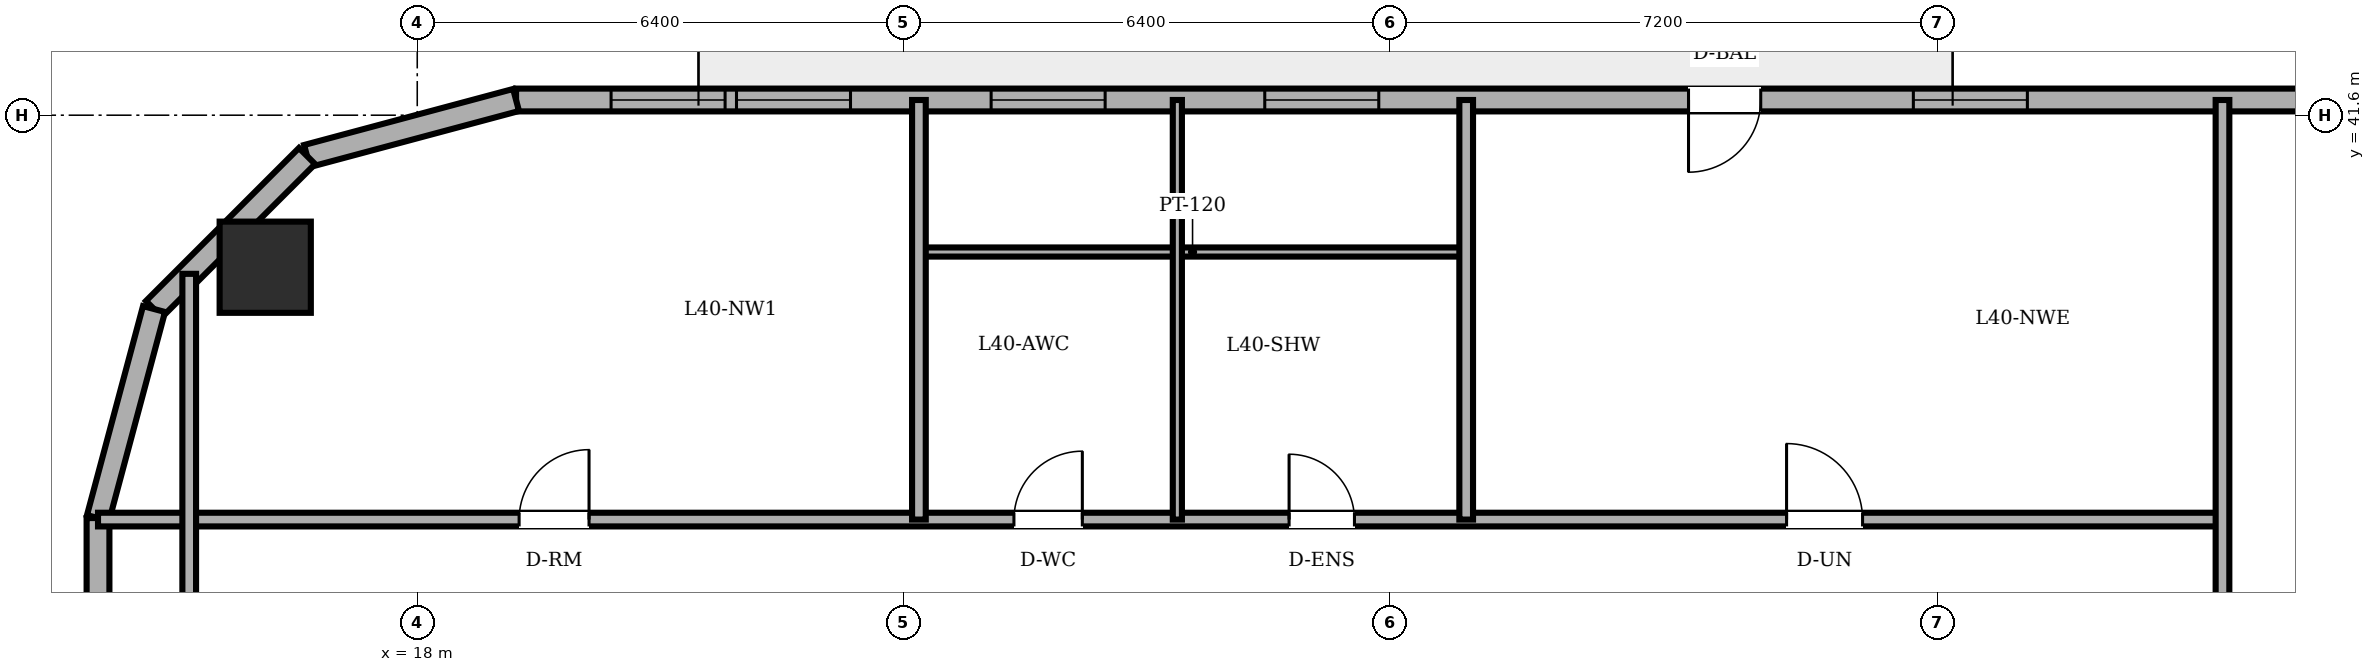
"""IFC4 building model, lengths in metres.
Left out: names, types, materials, properties, quantities, classifications, styles, units other than length and angle.
Written with IfcOpenShell. Run it as: python <this file> out.ifc"""

import sys

from ifc_helpers import new_model, si_unit, direction, frame, frame_2d, origin, origin_2d, place, context, subcontext, project, spatial, rectangle, circle, extrude, element, fill, save


model = new_model("IFC4")
c1 = context("Model", 3, precision=1e-05, world=origin(), true_north=direction((0.0, 1.0)))
c2 = subcontext(c1, "Body", "Model", "MODEL_VIEW")
j1 = project(units=[si_unit("LENGTHUNIT", "METRE"), si_unit("PLANEANGLEUNIT", "RADIAN")], contexts=[c1])
p1 = place(None, origin())
s1 = spatial("IfcSite", under=j1, at=p1, CompositionType="ELEMENT")
p2 = place(p1, origin())
s2 = spatial("IfcBuilding", under=s1, at=p2, CompositionType="ELEMENT")
p3 = place(p2, frame((0.0, 0.0, 154.6)))
s3 = spatial("IfcBuildingStorey", under=s2, at=p3, CompositionType="ELEMENT", Elevation=154.6)
p4 = place(p3, frame((16.0, 39.6, 0.0), z_axis=(0.0, 0.0, 1.0), x_axis=(1.0, 0.0, 0.0)))
e1 = element("IfcColumn", 1, at=p4, inside=s3, PredefinedType="COLUMN", context=c2, shape_type="SweptSolid", body=[
    extrude(circle(Radius=0.6, at=origin_2d()), origin(), (0.0, 0.0, 1.0), 3.6),
])
p5 = place(p3, frame((49.582, 41.8, 0.0), z_axis=(0.0, 0.0, 1.0), x_axis=(-1.0, 0.0, 0.0)))
e2 = element("IfcWall", 2, at=p5, inside=s3, PredefinedType="SOLIDWALL", context=c2, shape_type="SweptSolid", body=[
    extrude(rectangle(XDim=30.282, YDim=0.3, at=frame_2d((15.141, 0.0))), origin(), (0.0, 0.0, 1.0), 3.4),
])
p6 = place(p5, frame((13.907, 0.0, 0.0)))
e3 = element("IfcOpeningElement", 3, at=p6, cuts=e2, PredefinedType="OPENING", context=c2, shape_type="SweptSolid", body=[
    extrude(rectangle(XDim=0.95, YDim=2.2, at=frame_2d((0.475, 1.1))), frame((0.0, 0.16, 0.0), z_axis=(0.0, -1.0, 0.0), x_axis=(1.0, 0.0, 0.0)), (0.0, 0.0, 1.0), 0.32),
])
p7 = place(p5, frame((2.094, 0.0, 0.85)))
e4 = element("IfcOpeningElement", 4, at=p7, cuts=e2, PredefinedType="OPENING", context=c2, shape_type="SweptSolid", body=[
    extrude(rectangle(XDim=1.5, YDim=1.55, at=frame_2d((0.75, 0.775))), frame((0.0, 0.16, 0.0), z_axis=(0.0, -1.0, 0.0), x_axis=(1.0, 0.0, 0.0)), (0.0, 0.0, 1.0), 0.32),
])
p8 = place(p5, frame((4.588, 0.0, 0.85)))
e5 = element("IfcOpeningElement", 5, at=p8, cuts=e2, PredefinedType="OPENING", context=c2, shape_type="SweptSolid", body=[
    extrude(rectangle(XDim=1.5, YDim=1.55, at=frame_2d((0.75, 0.775))), frame((0.0, 0.16, 0.0), z_axis=(0.0, -1.0, 0.0), x_axis=(1.0, 0.0, 0.0)), (0.0, 0.0, 1.0), 0.32),
])
p9 = place(p5, frame((10.399, 0.0, 0.85)))
e6 = element("IfcOpeningElement", 6, at=p9, cuts=e2, PredefinedType="OPENING", context=c2, shape_type="SweptSolid", body=[
    extrude(rectangle(XDim=1.5, YDim=1.55, at=frame_2d((0.75, 0.775))), frame((0.0, 0.16, 0.0), z_axis=(0.0, -1.0, 0.0), x_axis=(1.0, 0.0, 0.0)), (0.0, 0.0, 1.0), 0.32),
])
p10 = place(p5, frame((18.932, 0.0, 0.85)))
e7 = element("IfcOpeningElement", 7, at=p10, cuts=e2, PredefinedType="OPENING", context=c2, shape_type="SweptSolid", body=[
    extrude(rectangle(XDim=1.5, YDim=1.55, at=frame_2d((0.75, 0.775))), frame((0.0, 0.16, 0.0), z_axis=(0.0, -1.0, 0.0), x_axis=(1.0, 0.0, 0.0)), (0.0, 0.0, 1.0), 0.32),
])
p11 = place(p5, frame((22.532, 0.0, 0.85)))
e8 = element("IfcOpeningElement", 8, at=p11, cuts=e2, PredefinedType="OPENING", context=c2, shape_type="SweptSolid", body=[
    extrude(rectangle(XDim=1.5, YDim=1.55, at=frame_2d((0.75, 0.775))), frame((0.0, 0.16, 0.0), z_axis=(0.0, -1.0, 0.0), x_axis=(1.0, 0.0, 0.0)), (0.0, 0.0, 1.0), 0.32),
])
p12 = place(p5, frame((25.882, 0.0, 0.85)))
e9 = element("IfcOpeningElement", 9, at=p12, cuts=e2, PredefinedType="OPENING", context=c2, shape_type="SweptSolid", body=[
    extrude(rectangle(XDim=1.5, YDim=1.55, at=frame_2d((0.75, 0.775))), frame((0.0, 0.16, 0.0), z_axis=(0.0, -1.0, 0.0), x_axis=(1.0, 0.0, 0.0)), (0.0, 0.0, 1.0), 0.32),
])
p13 = place(p5, frame((27.532, 0.0, 0.85)))
e10 = element("IfcOpeningElement", 10, at=p13, cuts=e2, PredefinedType="OPENING", context=c2, shape_type="SweptSolid", body=[
    extrude(rectangle(XDim=1.5, YDim=1.55, at=frame_2d((0.75, 0.775))), frame((0.0, 0.16, 0.0), z_axis=(0.0, -1.0, 0.0), x_axis=(1.0, 0.0, 0.0)), (0.0, 0.0, 1.0), 0.32),
])
p14 = place(p3, frame((19.3, 41.8, 0.0), z_axis=(0.0, 0.0, 1.0), x_axis=(-0.965908238586, -0.258884674387, 0.0)))
e11 = element("IfcWall", 11, at=p14, inside=s3, PredefinedType="SOLIDWALL", context=c2, shape_type="SweptSolid", body=[
    extrude(rectangle(XDim=2.847, YDim=0.3, at=frame_2d((1.424, 0.0))), origin(), (0.0, 0.0, 1.0), 3.4),
])
p15 = place(p3, frame((16.55, 41.063, 0.0), z_axis=(0.0, 0.0, 1.0), x_axis=(-0.707106781187, -0.707106781187, 0.0)))
e12 = element("IfcWall", 12, at=p15, inside=s3, PredefinedType="SOLIDWALL", context=c2, shape_type="SweptSolid", body=[
    extrude(rectangle(XDim=2.847, YDim=0.3, at=frame_2d((1.423, 0.0))), origin(), (0.0, 0.0, 1.0), 3.4),
])
p16 = place(p3, frame((14.537, 39.05, 0.0), z_axis=(0.0, 0.0, 1.0), x_axis=(-0.258884674387, -0.965908238586, 0.0)))
e13 = element("IfcWall", 13, at=p16, inside=s3, PredefinedType="SOLIDWALL", context=c2, shape_type="SweptSolid", body=[
    extrude(rectangle(XDim=2.847, YDim=0.3, at=frame_2d((1.424, 0.0))), origin(), (0.0, 0.0, 1.0), 3.4),
])
p17 = place(p3, frame((13.8, 36.3, 0.0), z_axis=(0.0, 0.0, 1.0), x_axis=(0.0, -1.0, 0.0)))
e14 = element("IfcWall", 14, at=p17, inside=s3, PredefinedType="SOLIDWALL", context=c2, shape_type="SweptSolid", body=[
    extrude(rectangle(XDim=24.6, YDim=0.3, at=frame_2d((12.3, 0.0))), origin(), (0.0, 0.0, 1.0), 3.4),
])
p18 = place(p17, frame((8.277, 0.0, 0.85)))
e15 = element("IfcOpeningElement", 15, at=p18, cuts=e14, PredefinedType="OPENING", context=c2, shape_type="SweptSolid", body=[
    extrude(rectangle(XDim=1.5, YDim=1.55, at=frame_2d((0.75, 0.775))), frame((0.0, 0.16, 0.0), z_axis=(0.0, -1.0, 0.0), x_axis=(1.0, 0.0, 0.0)), (0.0, 0.0, 1.0), 0.32),
])
p19 = place(p17, frame((14.823, 0.0, 0.85)))
e16 = element("IfcOpeningElement", 16, at=p19, cuts=e14, PredefinedType="OPENING", context=c2, shape_type="SweptSolid", body=[
    extrude(rectangle(XDim=1.5, YDim=1.55, at=frame_2d((0.75, 0.775))), frame((0.0, 0.16, 0.0), z_axis=(0.0, -1.0, 0.0), x_axis=(1.0, 0.0, 0.0)), (0.0, 0.0, 1.0), 0.32),
])
p20 = place(p3, frame((13.8, 36.28, 0.0), z_axis=(0.0, 0.0, 1.0), x_axis=(1.0, 0.0, 0.0)))
e17 = element("IfcWall", 17, at=p20, inside=s3, PredefinedType="PARTITIONING", context=c2, shape_type="SweptSolid", body=[
    extrude(rectangle(XDim=27.95, YDim=0.18, at=frame_2d((13.975, 0.0))), origin(), (0.0, 0.0, 1.0), 3.4),
])
p21 = place(p20, frame((12.05, 0.0, 0.0)))
e18 = element("IfcOpeningElement", 18, at=p21, cuts=e17, PredefinedType="OPENING", context=c2, shape_type="SweptSolid", body=[
    extrude(rectangle(XDim=0.9, YDim=2.1, at=frame_2d((0.45, 1.05))), frame((0.0, 0.1, 0.0), z_axis=(0.0, -1.0, 0.0), x_axis=(1.0, 0.0, 0.0)), (0.0, 0.0, 1.0), 0.2),
])
p22 = place(p20, frame((15.67, 0.0, 0.0)))
e19 = element("IfcOpeningElement", 19, at=p22, cuts=e17, PredefinedType="OPENING", context=c2, shape_type="SweptSolid", body=[
    extrude(rectangle(XDim=0.86, YDim=2.1, at=frame_2d((0.43, 1.05))), frame((0.0, 0.1, 0.0), z_axis=(0.0, -1.0, 0.0), x_axis=(1.0, 0.0, 0.0)), (0.0, 0.0, 1.0), 0.2),
])
p23 = place(p20, frame((5.54, 0.0, 0.0)))
e20 = element("IfcOpeningElement", 20, at=p23, cuts=e17, PredefinedType="OPENING", context=c2, shape_type="SweptSolid", body=[
    extrude(rectangle(XDim=0.92, YDim=2.1, at=frame_2d((0.46, 1.05))), frame((0.0, 0.1, 0.0), z_axis=(0.0, -1.0, 0.0), x_axis=(1.0, 0.0, 0.0)), (0.0, 0.0, 1.0), 0.2),
])
p24 = place(p20, frame((22.215, 0.0, 0.0)))
e21 = element("IfcOpeningElement", 21, at=p24, cuts=e17, PredefinedType="OPENING", context=c2, shape_type="SweptSolid", body=[
    extrude(rectangle(XDim=1.0, YDim=2.15, at=frame_2d((0.5, 1.075))), frame((0.0, 0.1, 0.0), z_axis=(0.0, -1.0, 0.0), x_axis=(1.0, 0.0, 0.0)), (0.0, 0.0, 1.0), 0.2),
])
p25 = place(p3, frame((24.6, 39.8, 0.0), z_axis=(0.0, 0.0, 1.0), x_axis=(1.0, 0.0, 0.0)))
e22 = element("IfcWall", 22, at=p25, inside=s3, PredefinedType="PARTITIONING", context=c2, shape_type="SweptSolid", body=[
    extrude(rectangle(XDim=7.2, YDim=0.12, at=frame_2d((3.6, 0.0))), origin(), (0.0, 0.0, 1.0), 2.882),
])
p26 = place(p3, frame((15.0, 33.82, 0.0), z_axis=(0.0, 0.0, 1.0), x_axis=(0.0, 1.0, 0.0)))
e23 = element("IfcWall", 23, at=p26, inside=s3, PredefinedType="PARTITIONING", context=c2, shape_type="SweptSolid", body=[
    extrude(rectangle(XDim=5.693, YDim=0.18, at=frame_2d((2.846, 0.0))), origin(), (0.0, 0.0, 1.0), 3.4),
])
p27 = place(p3, frame((24.6, 36.28, 0.0), z_axis=(0.0, 0.0, 1.0), x_axis=(0.0, 1.0, 0.0)))
e24 = element("IfcWall", 24, at=p27, inside=s3, PredefinedType="PARTITIONING", context=c2, shape_type="SweptSolid", body=[
    extrude(rectangle(XDim=5.52, YDim=0.18, at=frame_2d((2.76, 0.0))), origin(), (0.0, 0.0, 1.0), 3.4),
])
p28 = place(p3, frame((28.0, 36.28, 0.0), z_axis=(0.0, 0.0, 1.0), x_axis=(0.0, 1.0, 0.0)))
e25 = element("IfcWall", 25, at=p28, inside=s3, PredefinedType="PARTITIONING", context=c2, shape_type="SweptSolid", body=[
    extrude(rectangle(XDim=5.52, YDim=0.12, at=frame_2d((2.76, 0.0))), origin(), (0.0, 0.0, 1.0), 3.4),
])
p29 = place(p3, frame((31.8, 36.28, 0.0), z_axis=(0.0, 0.0, 1.0), x_axis=(0.0, 1.0, 0.0)))
e26 = element("IfcWall", 26, at=p29, inside=s3, PredefinedType="PARTITIONING", context=c2, shape_type="SweptSolid", body=[
    extrude(rectangle(XDim=5.52, YDim=0.18, at=frame_2d((2.76, 0.0))), origin(), (0.0, 0.0, 1.0), 3.4),
])
p30 = place(p3, frame((41.75, 25.18, 0.0), z_axis=(0.0, 0.0, 1.0), x_axis=(0.0, 1.0, 0.0)))
e27 = element("IfcWall", 27, at=p30, inside=s3, PredefinedType="PARTITIONING", context=c2, shape_type="SweptSolid", body=[
    extrude(rectangle(XDim=16.62, YDim=0.18, at=frame_2d((8.31, 0.0))), origin(), (0.0, 0.0, 1.0), 3.4),
])
p31 = place(p30, frame((5.35, 0.0, 0.0)))
e28 = element("IfcOpeningElement", 28, at=p31, cuts=e27, PredefinedType="OPENING", context=c2, shape_type="SweptSolid", body=[
    extrude(rectangle(XDim=0.92, YDim=2.1, at=frame_2d((0.46, 1.05))), frame((0.0, 0.1, 0.0), z_axis=(0.0, -1.0, 0.0), x_axis=(1.0, 0.0, 0.0)), (0.0, 0.0, 1.0), 0.2),
])
p32 = place(p6, origin())
e29 = element("IfcDoor", 29, at=p32, inside=s3, OperationType="SINGLE_SWING_RIGHT", PredefinedType="DOOR", context=c2, shape_type="SweptSolid", body=[
    extrude(rectangle(XDim=0.95, YDim=2.2, at=frame_2d((0.475, 1.1))), frame((0.0, 0.025, 0.0), z_axis=(0.0, -1.0, 0.0), x_axis=(1.0, 0.0, 0.0)), (0.0, 0.0, 1.0), 0.05),
])
fill(e3, e29)
p33 = place(p9, origin())
e30 = element("IfcWindow", 30, at=p33, inside=s3, PartitioningType="DOUBLE_PANEL_VERTICAL", PredefinedType="WINDOW", context=c2, shape_type="SweptSolid", body=[
    extrude(rectangle(XDim=1.5, YDim=1.55, at=frame_2d((0.75, 0.775))), frame((0.0, 0.03, 0.0), z_axis=(0.0, -1.0, 0.0), x_axis=(1.0, 0.0, 0.0)), (0.0, 0.0, 1.0), 0.06),
])
fill(e6, e30)
p34 = place(p10, origin())
e31 = element("IfcWindow", 31, at=p34, inside=s3, PartitioningType="DOUBLE_PANEL_VERTICAL", PredefinedType="WINDOW", context=c2, shape_type="SweptSolid", body=[
    extrude(rectangle(XDim=1.5, YDim=1.55, at=frame_2d((0.75, 0.775))), frame((0.0, 0.03, 0.0), z_axis=(0.0, -1.0, 0.0), x_axis=(1.0, 0.0, 0.0)), (0.0, 0.0, 1.0), 0.06),
])
fill(e7, e31)
p35 = place(p11, origin())
e32 = element("IfcWindow", 32, at=p35, inside=s3, PartitioningType="DOUBLE_PANEL_VERTICAL", PredefinedType="WINDOW", context=c2, shape_type="SweptSolid", body=[
    extrude(rectangle(XDim=1.5, YDim=1.55, at=frame_2d((0.75, 0.775))), frame((0.0, 0.03, 0.0), z_axis=(0.0, -1.0, 0.0), x_axis=(1.0, 0.0, 0.0)), (0.0, 0.0, 1.0), 0.06),
])
fill(e8, e32)
p36 = place(p12, origin())
e33 = element("IfcWindow", 33, at=p36, inside=s3, PartitioningType="DOUBLE_PANEL_VERTICAL", PredefinedType="WINDOW", context=c2, shape_type="SweptSolid", body=[
    extrude(rectangle(XDim=1.5, YDim=1.55, at=frame_2d((0.75, 0.775))), frame((0.0, 0.03, 0.0), z_axis=(0.0, -1.0, 0.0), x_axis=(1.0, 0.0, 0.0)), (0.0, 0.0, 1.0), 0.06),
])
fill(e9, e33)
p37 = place(p13, origin())
e34 = element("IfcWindow", 34, at=p37, inside=s3, PartitioningType="DOUBLE_PANEL_VERTICAL", PredefinedType="WINDOW", context=c2, shape_type="SweptSolid", body=[
    extrude(rectangle(XDim=1.5, YDim=1.55, at=frame_2d((0.75, 0.775))), frame((0.0, 0.03, 0.0), z_axis=(0.0, -1.0, 0.0), x_axis=(1.0, 0.0, 0.0)), (0.0, 0.0, 1.0), 0.06),
])
fill(e10, e34)
p38 = place(p21, origin())
e35 = element("IfcDoor", 35, at=p38, inside=s3, OperationType="SINGLE_SWING_RIGHT", PredefinedType="DOOR", context=c2, shape_type="SweptSolid", body=[
    extrude(rectangle(XDim=0.9, YDim=2.1, at=frame_2d((0.45, 1.05))), frame((0.0, 0.025, 0.0), z_axis=(0.0, -1.0, 0.0), x_axis=(1.0, 0.0, 0.0)), (0.0, 0.0, 1.0), 0.05),
])
fill(e18, e35)
p39 = place(p22, origin())
e36 = element("IfcDoor", 36, at=p39, inside=s3, OperationType="SINGLE_SWING_LEFT", PredefinedType="DOOR", context=c2, shape_type="SweptSolid", body=[
    extrude(rectangle(XDim=0.86, YDim=2.1, at=frame_2d((0.43, 1.05))), frame((0.0, 0.025, 0.0), z_axis=(0.0, -1.0, 0.0), x_axis=(1.0, 0.0, 0.0)), (0.0, 0.0, 1.0), 0.05),
])
fill(e19, e36)
p40 = place(p23, origin())
e37 = element("IfcDoor", 37, at=p40, inside=s3, OperationType="SINGLE_SWING_RIGHT", PredefinedType="DOOR", context=c2, shape_type="SweptSolid", body=[
    extrude(rectangle(XDim=0.92, YDim=2.1, at=frame_2d((0.46, 1.05))), frame((0.0, 0.025, 0.0), z_axis=(0.0, -1.0, 0.0), x_axis=(1.0, 0.0, 0.0)), (0.0, 0.0, 1.0), 0.05),
])
fill(e20, e37)
p41 = place(p24, origin())
e38 = element("IfcDoor", 38, at=p41, inside=s3, OperationType="SINGLE_SWING_LEFT", PredefinedType="DOOR", context=c2, shape_type="SweptSolid", body=[
    extrude(rectangle(XDim=1.0, YDim=2.15, at=frame_2d((0.5, 1.075))), frame((0.0, 0.025, 0.0), z_axis=(0.0, -1.0, 0.0), x_axis=(1.0, 0.0, 0.0)), (0.0, 0.0, 1.0), 0.05),
])
fill(e21, e38)
save(model, sys.argv[1])
